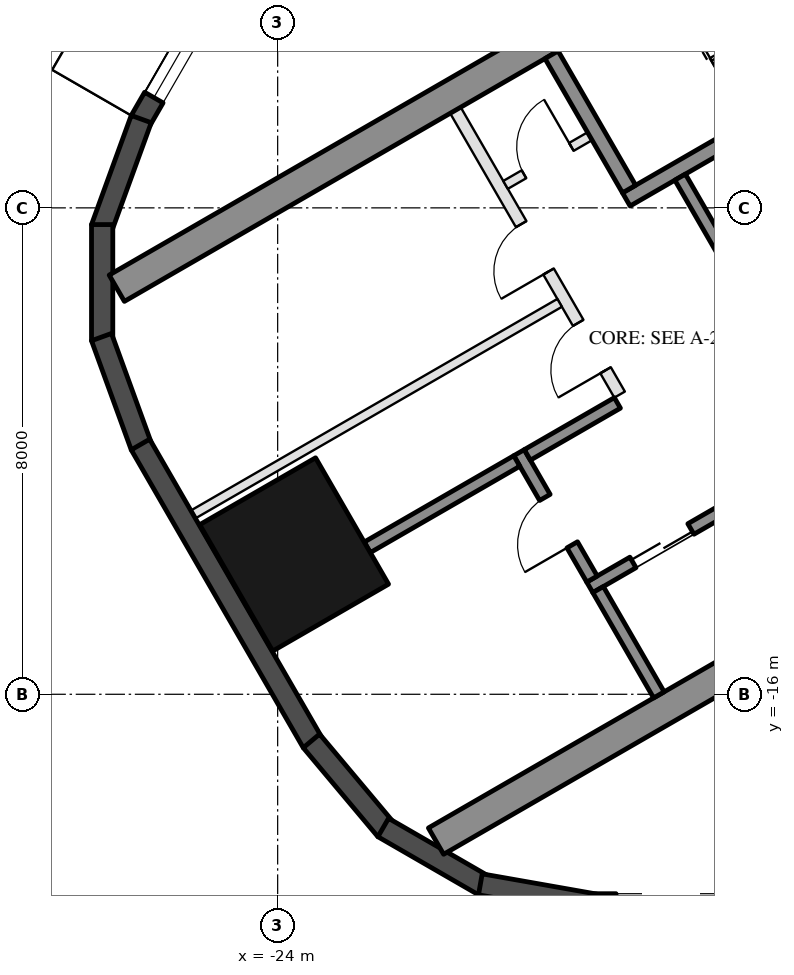
"""IFC4 building model, lengths in metres.
Left out: names, types, materials, properties, quantities, classifications, styles, units other than length and angle.
Written with IfcOpenShell. Run it as: python <this file> out.ifc"""

import sys

from ifc_helpers import new_model, si_unit, direction, frame, frame_2d, origin, origin_2d, place, context, subcontext, project, spatial, rectangle, hollow_rectangle, extrude, element, fill, save


model = new_model("IFC4")
c1 = context("Model", 3, precision=1e-05, world=origin(), true_north=direction((0.0, 1.0)))
c2 = subcontext(c1, "Body", "Model", "MODEL_VIEW")
j1 = project(units=[si_unit("LENGTHUNIT", "METRE"), si_unit("PLANEANGLEUNIT", "RADIAN")], contexts=[c1])
p1 = place(None, origin())
s1 = spatial("IfcSite", under=j1, at=p1, CompositionType="ELEMENT")
p2 = place(p1, origin())
s2 = spatial("IfcBuilding", under=s1, at=p2, CompositionType="ELEMENT")
p3 = place(p2, frame((0.0, 0.0, 172.5)))
s3 = spatial("IfcBuildingStorey", under=s2, at=p3, CompositionType="ELEMENT", Elevation=172.5)
p4 = place(p3, frame((-23.729, -13.7, 0.0), z_axis=(0.0, 0.0, 1.0), x_axis=(-0.5, 0.866025403784, 0.0)))
e1 = element("IfcColumn", 1, at=p4, inside=s3, PredefinedType="COLUMN", context=c2, shape_type="SweptSolid", body=[
    extrude(hollow_rectangle(XDim=2.4, YDim=2.2, WallThickness=0.06, at=origin_2d()), origin(), (0.0, 0.0, 1.0), 3.7),
])
p5 = place(p3, frame((-24.299, -3.176, 0.0), z_axis=(0.0, 0.0, 1.0), x_axis=(-0.500028278809, -0.866009076391, 0.0)))
e2 = element("IfcWall", 2, at=p5, inside=s3, PredefinedType="SOLIDWALL", context=c2, shape_type="SweptSolid", body=[
    extrude(rectangle(XDim=3.916, YDim=0.35, at=frame_2d((1.958, 0.0))), origin(), (0.0, 0.0, 1.0), 3.55),
])
p6 = place(p5, frame((1.675, 0.0, 0.3)))
e3 = element("IfcOpeningElement", 3, at=p6, cuts=e2, PredefinedType="OPENING", context=c2, shape_type="SweptSolid", body=[
    extrude(rectangle(XDim=1.8, YDim=2.65, at=frame_2d((0.9, 1.325))), frame((0.0, 0.185, 0.0), z_axis=(0.0, -1.0, 0.0), x_axis=(1.0, 0.0, 0.0)), (0.0, 0.0, 1.0), 0.37),
])
for number, where, z_axis, x_axis in (
    (4, (-26.244, -6.54, 0.0), (0.0, 0.0, 1.0), (-0.342, -0.94, 0.0)),
    (5, (-26.886, -8.275, 0.0), (0.0, 0.0, 1.0), (0.0, -1.0, 0.0)),
    (6, (-26.897, -10.125, 0.0), (0.0, 0.0, 1.0), (0.342, -0.94, 0.0)),
):
    element("IfcWall", number, at=place(p3, frame(where, z_axis=z_axis, x_axis=x_axis)), inside=s3, PredefinedType="SOLIDWALL", context=c2, shape_type="SweptSolid", body=[
        extrude(rectangle(XDim=1.91, YDim=0.35, at=frame_2d((0.955, 0.0))), origin(), (0.0, 0.0, 1.0), 3.55),
    ])
p7 = place(p3, frame((-26.257, -11.893, 0.0), z_axis=(0.0, 0.0, 1.0), x_axis=(0.500018773155, -0.866014564827, 0.0)))
e7 = element("IfcWall", 7, at=p7, inside=s3, PredefinedType="SOLIDWALL", context=c2, shape_type="SweptSolid", body=[
    extrude(rectangle(XDim=5.658, YDim=0.35, at=frame_2d((2.829, 0.0))), origin(), (0.0, 0.0, 1.0), 3.55),
])
for number, where, z_axis, x_axis in (
    (8, (-23.445, -16.768, 0.0), (0.0, 0.0, 1.0), (0.643, -0.766, 0.0)),
    (9, (-22.264, -18.192, 0.0), (0.0, 0.0, 1.0), (0.866, -0.5, 0.0)),
):
    element("IfcWall", number, at=place(p3, frame(where, z_axis=z_axis, x_axis=x_axis)), inside=s3, PredefinedType="SOLIDWALL", context=c2, shape_type="SweptSolid", body=[
        extrude(rectangle(XDim=1.91, YDim=0.35, at=frame_2d((0.955, 0.0))), origin(), (0.0, 0.0, 1.0), 3.55),
    ])
p8 = place(p3, frame((-20.667, -19.126, 0.0), z_axis=(0.0, 0.0, 1.0), x_axis=(0.984798995425, -0.173697837091, 0.0)))
e10 = element("IfcWall", 10, at=p8, inside=s3, PredefinedType="SOLIDWALL", context=c2, shape_type="SweptSolid", body=[
    extrude(rectangle(XDim=1.91, YDim=0.35, at=frame_2d((0.955, 0.0))), origin(), (0.0, 0.0, 1.0), 3.55),
])
p9 = place(p3, frame((-18.816, -19.455, 0.0), z_axis=(0.0, 0.0, 1.0), x_axis=(1.0, 0.0, 0.0)))
e11 = element("IfcWall", 11, at=p9, inside=s3, PredefinedType="SOLIDWALL", context=c2, shape_type="SweptSolid", body=[
    extrude(rectangle(XDim=11.816, YDim=0.35, at=frame_2d((5.908, 0.0))), origin(), (0.0, 0.0, 1.0), 3.55),
])
p10 = place(p9, frame((0.381, 0.0, 0.3)))
e12 = element("IfcOpeningElement", 12, at=p10, cuts=e11, PredefinedType="OPENING", context=c2, shape_type="SweptSolid", body=[
    extrude(rectangle(XDim=1.8, YDim=2.65, at=frame_2d((0.9, 1.325))), frame((0.0, 0.185, 0.0), z_axis=(0.0, -1.0, 0.0), x_axis=(1.0, 0.0, 0.0)), (0.0, 0.0, 1.0), 0.37),
])
p11 = place(p9, frame((7.74, 0.0, 0.0)))
e13 = element("IfcOpeningElement", 13, at=p11, cuts=e11, PredefinedType="OPENING", context=c2, shape_type="SweptSolid", body=[
    extrude(rectangle(XDim=2.4, YDim=2.4, at=frame_2d((1.2, 1.2))), frame((0.0, 0.185, 0.0), z_axis=(0.0, -1.0, 0.0), x_axis=(1.0, 0.0, 0.0)), (0.0, 0.0, 1.0), 0.37),
])
p12 = place(p9, frame((3.791, 0.0, 0.3)))
e14 = element("IfcOpeningElement", 14, at=p12, cuts=e11, PredefinedType="OPENING", context=c2, shape_type="SweptSolid", body=[
    extrude(rectangle(XDim=1.6, YDim=2.65, at=frame_2d((0.8, 1.325))), frame((0.0, 0.185, 0.0), z_axis=(0.0, -1.0, 0.0), x_axis=(1.0, 0.0, 0.0)), (0.0, 0.0, 1.0), 0.37),
])
p13 = place(p9, frame((5.691, 0.0, 0.3)))
e15 = element("IfcOpeningElement", 15, at=p13, cuts=e11, PredefinedType="OPENING", context=c2, shape_type="SweptSolid", body=[
    extrude(rectangle(XDim=1.6, YDim=2.65, at=frame_2d((0.8, 1.325))), frame((0.0, 0.185, 0.0), z_axis=(0.0, -1.0, 0.0), x_axis=(1.0, 0.0, 0.0)), (0.0, 0.0, 1.0), 0.37),
])
for number, where, z_axis, x_axis in (
    (16, (-13.797, -1.903, 0.0), (0.0, 0.0, 1.0), (-0.866, -0.5, 0.0)),
    (17, (-8.547, -10.997, 0.0), (0.0, 0.0, 1.0), (-0.866, -0.5, 0.0)),
):
    element("IfcWall", number, at=place(p3, frame(where, z_axis=z_axis, x_axis=x_axis)), inside=s3, PredefinedType="SHEAR", context=c2, shape_type="SweptSolid", body=[
        extrude(rectangle(XDim=14.837, YDim=0.5, at=frame_2d((7.418, 0.0))), origin(), (0.0, 0.0, 1.0), 3.5),
    ])
p14 = place(p3, frame((-12.681, -4.636, 0.0), z_axis=(0.0, 0.0, 1.0), x_axis=(-0.866021702275, -0.500006411147, 0.0)))
e18 = element("IfcWall", 18, at=p14, inside=s3, PredefinedType="SHEAR", context=c2, shape_type="SweptSolid", body=[
    extrude(rectangle(XDim=6.45, YDim=0.25, at=frame_2d((3.225, 0.0))), origin(), (0.0, 0.0, 1.0), 3.5),
])
p15 = place(p14, frame((0.3, 0.0, 0.0)))
e19 = element("IfcOpeningElement", 19, at=p15, cuts=e18, PredefinedType="OPENING", context=c2, shape_type="SweptSolid", body=[
    extrude(rectangle(XDim=1.0, YDim=2.1, at=frame_2d((0.5, 1.05))), frame((0.0, 0.135, 0.0), z_axis=(0.0, -1.0, 0.0), x_axis=(1.0, 0.0, 0.0)), (0.0, 0.0, 1.0), 0.27),
])
p16 = place(p3, frame((-19.496, -5.482, 0.0), z_axis=(0.0, 0.0, 1.0), x_axis=(0.499990435942, -0.866030925526, 0.0)))
e20 = element("IfcWall", 20, at=p16, inside=s3, PredefinedType="SHEAR", context=c2, shape_type="SweptSolid", body=[
    extrude(rectangle(XDim=2.55, YDim=0.25, at=frame_2d((1.275, 0.0))), origin(), (0.0, 0.0, 1.0), 3.5),
])
p17 = place(p3, frame((-17.381, -7.495, 0.0), z_axis=(0.0, 0.0, 1.0), x_axis=(0.500011755427, -0.866018616679, 0.0)))
e21 = element("IfcWall", 21, at=p17, inside=s3, PredefinedType="SHEAR", context=c2, shape_type="SweptSolid", body=[
    extrude(rectangle(XDim=2.8, YDim=0.2, at=frame_2d((1.4, 0.0))), origin(), (0.0, 0.0, 1.0), 3.5),
])
p18 = place(p3, frame((-10.068, -9.162, 0.0), z_axis=(0.0, 0.0, 1.0), x_axis=(-0.866032725843, -0.499987317609, 0.0)))
e22 = element("IfcWall", 22, at=p18, inside=s3, PredefinedType="SHEAR", context=c2, shape_type="SweptSolid", body=[
    extrude(rectangle(XDim=10.16, YDim=0.2, at=frame_2d((5.08, 0.0))), origin(), (0.0, 0.0, 1.0), 3.5),
])
p19 = place(p18, frame((0.62, 0.0, 0.0)))
e23 = element("IfcOpeningElement", 23, at=p19, cuts=e22, PredefinedType="OPENING", context=c2, shape_type="SweptSolid", body=[
    extrude(rectangle(XDim=1.1, YDim=2.1, at=frame_2d((0.55, 1.05))), frame((0.0, 0.11, 0.0), z_axis=(0.0, -1.0, 0.0), x_axis=(1.0, 0.0, 0.0)), (0.0, 0.0, 1.0), 0.22),
])
p20 = place(p18, frame((3.16, 0.0, 0.0)))
e24 = element("IfcOpeningElement", 24, at=p20, cuts=e22, PredefinedType="OPENING", context=c2, shape_type="SweptSolid", body=[
    extrude(rectangle(XDim=1.1, YDim=2.1, at=frame_2d((0.55, 1.05))), frame((0.0, 0.11, 0.0), z_axis=(0.0, -1.0, 0.0), x_axis=(1.0, 0.0, 0.0)), (0.0, 0.0, 1.0), 0.22),
])
p21 = place(p18, frame((5.7, 0.0, 0.0)))
e25 = element("IfcOpeningElement", 25, at=p21, cuts=e22, PredefinedType="OPENING", context=c2, shape_type="SweptSolid", body=[
    extrude(rectangle(XDim=1.1, YDim=2.1, at=frame_2d((0.55, 1.05))), frame((0.0, 0.11, 0.0), z_axis=(0.0, -1.0, 0.0), x_axis=(1.0, 0.0, 0.0)), (0.0, 0.0, 1.0), 0.22),
])
p22 = place(p18, frame((8.24, 0.0, 0.0)))
e26 = element("IfcOpeningElement", 26, at=p22, cuts=e22, PredefinedType="OPENING", context=c2, shape_type="SweptSolid", body=[
    extrude(rectangle(XDim=1.1, YDim=2.1, at=frame_2d((0.55, 1.05))), frame((0.0, 0.11, 0.0), z_axis=(0.0, -1.0, 0.0), x_axis=(1.0, 0.0, 0.0)), (0.0, 0.0, 1.0), 0.22),
])
p23 = place(p3, frame((-20.031, -12.026, 0.0), z_axis=(0.0, 0.0, 1.0), x_axis=(0.500033551112, -0.866006032174, 0.0)))
e27 = element("IfcWall", 27, at=p23, inside=s3, PredefinedType="SHEAR", context=c2, shape_type="SweptSolid", body=[
    extrude(rectangle(XDim=2.4, YDim=0.2, at=frame_2d((1.2, 0.0))), origin(), (0.0, 0.0, 1.0), 3.5),
])
p24 = place(p23, frame((0.85, 0.0, 0.0)))
e28 = element("IfcOpeningElement", 28, at=p24, cuts=e27, PredefinedType="OPENING", context=c2, shape_type="SweptSolid", body=[
    extrude(rectangle(XDim=0.9, YDim=2.1, at=frame_2d((0.45, 1.05))), frame((0.0, 0.11, 0.0), z_axis=(0.0, -1.0, 0.0), x_axis=(1.0, 0.0, 0.0)), (0.0, 0.0, 1.0), 0.22),
])
p25 = place(p3, frame((-18.413, -11.208, 0.0), z_axis=(0.0, 0.0, 1.0), x_axis=(-0.866038183914, -0.499977863513, 0.0)))
e29 = element("IfcWall", 29, at=p25, inside=s3, PredefinedType="SHEAR", context=c2, shape_type="SweptSolid", body=[
    extrude(rectangle(XDim=1.71, YDim=0.2, at=frame_2d((0.855, 0.0))), origin(), (0.0, 0.0, 1.0), 3.5),
])
p26 = place(p3, frame((-18.73, -14.278, 0.0), z_axis=(0.0, 0.0, 1.0), x_axis=(0.50002537861, -0.866010750942, 0.0)))
e30 = element("IfcWall", 30, at=p26, inside=s3, PredefinedType="SHEAR", context=c2, shape_type="SweptSolid", body=[
    extrude(rectangle(XDim=2.0, YDim=0.2, at=frame_2d((1.0, 0.0))), origin(), (0.0, 0.0, 1.0), 3.5),
])
p27 = place(p3, frame((-20.067, -12.163, 0.0), z_axis=(0.0, 0.0, 1.0), x_axis=(-0.866055327414, -0.49994816717, 0.0)))
e31 = element("IfcWall", 31, at=p27, inside=s3, PredefinedType="SHEAR", context=c2, shape_type="SweptSolid", body=[
    extrude(rectangle(XDim=2.84, YDim=0.2, at=frame_2d((1.42, 0.0))), origin(), (0.0, 0.0, 1.0), 3.5),
])
p28 = place(p3, frame((-21.076, -6.395, 0.0), z_axis=(0.0, 0.0, 1.0), x_axis=(0.50001468107, -0.866016927499, 0.0)))
e32 = element("IfcWall", 32, at=p28, inside=s3, PredefinedType="PARTITIONING", context=c2, shape_type="SweptSolid", body=[
    extrude(rectangle(XDim=5.4, YDim=0.2, at=frame_2d((2.7, 0.0))), origin(), (0.0, 0.0, 1.0), 3.5),
])
p29 = place(p28, frame((2.163, 0.0, 0.0)))
e33 = element("IfcOpeningElement", 33, at=p29, cuts=e32, PredefinedType="OPENING", context=c2, shape_type="SweptSolid", body=[
    extrude(rectangle(XDim=0.9, YDim=2.1, at=frame_2d((0.45, 1.05))), frame((0.0, 0.11, 0.0), z_axis=(0.0, -1.0, 0.0), x_axis=(1.0, 0.0, 0.0)), (0.0, 0.0, 1.0), 0.22),
])
p30 = place(p28, frame((4.038, 0.0, 0.0)))
e34 = element("IfcOpeningElement", 34, at=p30, cuts=e32, PredefinedType="OPENING", context=c2, shape_type="SweptSolid", body=[
    extrude(rectangle(XDim=0.9, YDim=2.1, at=frame_2d((0.45, 1.05))), frame((0.0, 0.11, 0.0), z_axis=(0.0, -1.0, 0.0), x_axis=(1.0, 0.0, 0.0)), (0.0, 0.0, 1.0), 0.22),
])
p31 = place(p3, frame((-18.866, -6.822, 0.0), z_axis=(0.0, 0.0, 1.0), x_axis=(-0.866028054938, -0.499995408039, 0.0)))
e35 = element("IfcWall", 35, at=p31, inside=s3, PredefinedType="PARTITIONING", context=c2, shape_type="SweptSolid", body=[
    extrude(rectangle(XDim=1.6, YDim=0.15, at=frame_2d((0.8, 0.0))), origin(), (0.0, 0.0, 1.0), 3.5),
])
p32 = place(p31, frame((0.35, 0.0, 0.0)))
e36 = element("IfcOpeningElement", 36, at=p32, cuts=e35, PredefinedType="OPENING", context=c2, shape_type="SweptSolid", body=[
    extrude(rectangle(XDim=0.9, YDim=2.1, at=frame_2d((0.45, 1.05))), frame((0.0, 0.085, 0.0), z_axis=(0.0, -1.0, 0.0), x_axis=(1.0, 0.0, 0.0)), (0.0, 0.0, 1.0), 0.17),
])
p33 = place(p3, frame((-19.363, -9.562, 0.0), z_axis=(0.0, 0.0, 1.0), x_axis=(-0.866016523273, -0.500015381182, 0.0)))
e37 = element("IfcWall", 37, at=p33, inside=s3, PredefinedType="PARTITIONING", context=c2, shape_type="SweptSolid", body=[
    extrude(rectangle(XDim=6.95, YDim=0.15, at=frame_2d((3.475, 0.0))), origin(), (0.0, 0.0, 1.0), 3.5),
])
p34 = place(p6, origin())
e38 = element("IfcWindow", 38, at=p34, inside=s3, PartitioningType="SINGLE_PANEL", PredefinedType="WINDOW", context=c2, shape_type="SweptSolid", body=[
    extrude(rectangle(XDim=1.8, YDim=2.65, at=frame_2d((0.9, 1.325))), frame((0.0, 0.03, 0.0), z_axis=(0.0, -1.0, 0.0), x_axis=(1.0, 0.0, 0.0)), (0.0, 0.0, 1.0), 0.06),
])
fill(e3, e38)
p35 = place(p32, frame((0.9, 0.0, 0.0), z_axis=(0.0, 0.0, 1.0), x_axis=(-1.0, 0.0, 0.0)))
e39 = element("IfcDoor", 39, at=p35, inside=s3, OperationType="SINGLE_SWING_RIGHT", PredefinedType="DOOR", context=c2, shape_type="SweptSolid", body=[
    extrude(rectangle(XDim=0.9, YDim=2.1, at=frame_2d((0.45, 1.05))), frame((0.0, 0.025, 0.0), z_axis=(0.0, -1.0, 0.0), x_axis=(1.0, 0.0, 0.0)), (0.0, 0.0, 1.0), 0.05),
])
fill(e36, e39)
p36 = place(p22, origin())
e40 = element("IfcDoor", 40, at=p36, inside=s3, OperationType="DOUBLE_DOOR_SLIDING", PredefinedType="DOOR", context=c2, shape_type="SweptSolid", body=[
    extrude(rectangle(XDim=1.1, YDim=2.1, at=frame_2d((0.55, 1.05))), frame((0.0, 0.025, 0.0), z_axis=(0.0, -1.0, 0.0), x_axis=(1.0, 0.0, 0.0)), (0.0, 0.0, 1.0), 0.05),
])
fill(e26, e40)
p37 = place(p24, frame((0.9, 0.0, 0.0), z_axis=(0.0, 0.0, 1.0), x_axis=(-1.0, 0.0, 0.0)))
e41 = element("IfcDoor", 41, at=p37, inside=s3, OperationType="SINGLE_SWING_LEFT", PredefinedType="DOOR", context=c2, shape_type="SweptSolid", body=[
    extrude(rectangle(XDim=0.9, YDim=2.1, at=frame_2d((0.45, 1.05))), frame((0.0, 0.025, 0.0), z_axis=(0.0, -1.0, 0.0), x_axis=(1.0, 0.0, 0.0)), (0.0, 0.0, 1.0), 0.05),
])
fill(e28, e41)
p38 = place(p29, frame((0.9, 0.0, 0.0), z_axis=(0.0, 0.0, 1.0), x_axis=(-1.0, 0.0, 0.0)))
e42 = element("IfcDoor", 42, at=p38, inside=s3, OperationType="SINGLE_SWING_LEFT", PredefinedType="DOOR", context=c2, shape_type="SweptSolid", body=[
    extrude(rectangle(XDim=0.9, YDim=2.1, at=frame_2d((0.45, 1.05))), frame((0.0, 0.025, 0.0), z_axis=(0.0, -1.0, 0.0), x_axis=(1.0, 0.0, 0.0)), (0.0, 0.0, 1.0), 0.05),
])
fill(e33, e42)
p39 = place(p30, frame((0.9, 0.0, 0.0), z_axis=(0.0, 0.0, 1.0), x_axis=(-1.0, 0.0, 0.0)))
e43 = element("IfcDoor", 43, at=p39, inside=s3, OperationType="SINGLE_SWING_LEFT", PredefinedType="DOOR", context=c2, shape_type="SweptSolid", body=[
    extrude(rectangle(XDim=0.9, YDim=2.1, at=frame_2d((0.45, 1.05))), frame((0.0, 0.025, 0.0), z_axis=(0.0, -1.0, 0.0), x_axis=(1.0, 0.0, 0.0)), (0.0, 0.0, 1.0), 0.05),
])
fill(e34, e43)
save(model, sys.argv[1])
